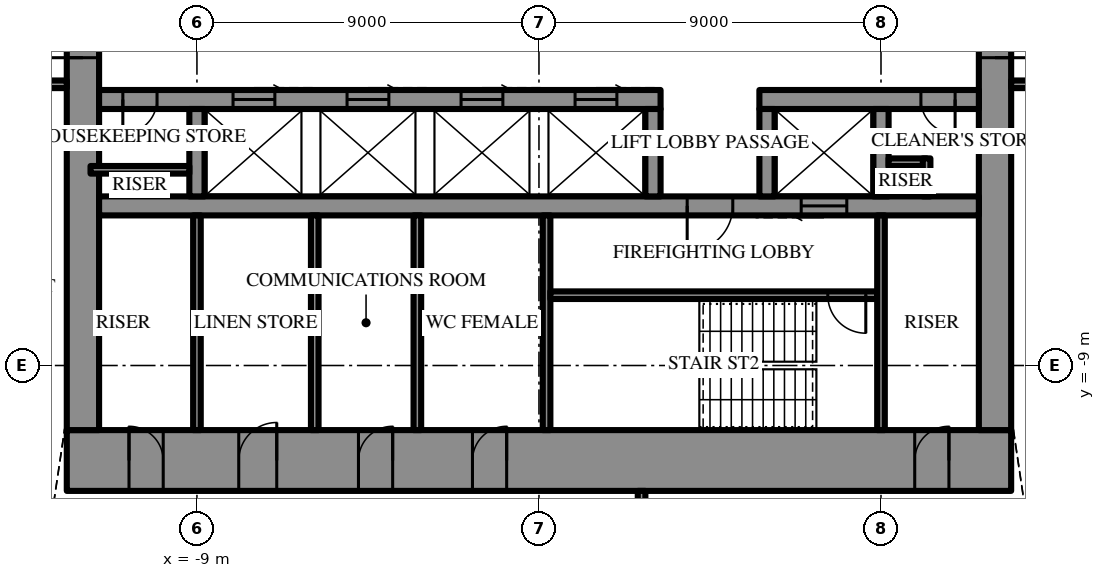
"""IFC4 building model, lengths in metres.
Left out: names, types, materials, properties, quantities, classifications, styles, units other than length and angle.
Written with IfcOpenShell. Run it as: python <this file> out.ifc"""

import sys

from ifc_helpers import new_model, si_unit, direction, frame, frame_2d, origin, place, context, subcontext, project, spatial, rectangle, extrude, element, fill, save


model = new_model("IFC4")
c1 = context("Model", 3, precision=1e-05, world=origin(), true_north=direction((0.0, 1.0)))
c2 = subcontext(c1, "Body", "Model", "MODEL_VIEW")
j1 = project(units=[si_unit("LENGTHUNIT", "METRE"), si_unit("PLANEANGLEUNIT", "RADIAN")], contexts=[c1])
p1 = place(None, origin())
s1 = spatial("IfcSite", under=j1, at=p1, CompositionType="ELEMENT")
p2 = place(p1, origin())
s2 = spatial("IfcBuilding", under=s1, at=p2, CompositionType="ELEMENT")
p3 = place(p2, frame((0.0, 0.0, 328.3)))
s3 = spatial("IfcBuildingStorey", under=s2, at=p3, CompositionType="ELEMENT", Elevation=328.3)
p4 = place(p3, frame((12.425, -11.5, 0.0), z_axis=(0.0, 0.0, 1.0), x_axis=(-1.0, 0.0, 0.0)))
e1 = element("IfcWall", 1, at=p4, inside=s3, PredefinedType="SHEAR", context=c2, shape_type="SweptSolid", body=[
    extrude(rectangle(XDim=24.85, YDim=1.6, at=frame_2d((12.425, 0.0))), origin(), (0.0, 0.0, 1.0), 4.2),
])
p5 = place(p4, frame((13.275, 0.0, 0.0)))
e2 = element("IfcOpeningElement", 2, at=p5, cuts=e1, PredefinedType="OPENING", context=c2, shape_type="SweptSolid", body=[
    extrude(rectangle(XDim=0.9, YDim=2.2, at=frame_2d((0.45, 1.1))), frame((0.0, 0.81, 0.0), z_axis=(0.0, -1.0, 0.0), x_axis=(1.0, 0.0, 0.0)), (0.0, 0.0, 1.0), 1.62),
])
p6 = place(p4, frame((16.275, 0.0, 0.0)))
e3 = element("IfcOpeningElement", 3, at=p6, cuts=e1, PredefinedType="OPENING", context=c2, shape_type="SweptSolid", body=[
    extrude(rectangle(XDim=0.9, YDim=2.2, at=frame_2d((0.45, 1.1))), frame((0.0, 0.81, 0.0), z_axis=(0.0, -1.0, 0.0), x_axis=(1.0, 0.0, 0.0)), (0.0, 0.0, 1.0), 1.62),
])
p7 = place(p4, frame((19.325, 0.0, 0.0)))
e4 = element("IfcOpeningElement", 4, at=p7, cuts=e1, PredefinedType="OPENING", context=c2, shape_type="SweptSolid", body=[
    extrude(rectangle(XDim=1.0, YDim=2.2, at=frame_2d((0.5, 1.1))), frame((0.0, 0.81, 0.0), z_axis=(0.0, -1.0, 0.0), x_axis=(1.0, 0.0, 0.0)), (0.0, 0.0, 1.0), 1.62),
])
p8 = place(p4, frame((1.637, 0.0, 0.0)))
e5 = element("IfcOpeningElement", 5, at=p8, cuts=e1, PredefinedType="OPENING", context=c2, shape_type="SweptSolid", body=[
    extrude(rectangle(XDim=0.9, YDim=2.2, at=frame_2d((0.45, 1.1))), frame((0.0, 0.81, 0.0), z_axis=(0.0, -1.0, 0.0), x_axis=(1.0, 0.0, 0.0)), (0.0, 0.0, 1.0), 1.62),
])
p9 = place(p4, frame((22.312, 0.0, 0.0)))
e6 = element("IfcOpeningElement", 6, at=p9, cuts=e1, PredefinedType="OPENING", context=c2, shape_type="SweptSolid", body=[
    extrude(rectangle(XDim=0.9, YDim=2.2, at=frame_2d((0.45, 1.1))), frame((0.0, 0.81, 0.0), z_axis=(0.0, -1.0, 0.0), x_axis=(1.0, 0.0, 0.0)), (0.0, 0.0, 1.0), 1.62),
])
p10 = place(p3, frame((12.0, -10.7, 0.0), z_axis=(0.0, 0.0, 1.0), x_axis=(0.0, 1.0, 0.0)))
e7 = element("IfcWall", 7, at=p10, inside=s3, PredefinedType="SHEAR", context=c2, shape_type="SweptSolid", body=[
    extrude(rectangle(XDim=21.4, YDim=0.85, at=frame_2d((10.7, 0.0))), origin(), (0.0, 0.0, 1.0), 4.2),
])
p11 = place(p10, frame((9.8, 0.0, 0.0)))
e8 = element("IfcOpeningElement", 8, at=p11, cuts=e7, PredefinedType="OPENING", context=c2, shape_type="SweptSolid", body=[
    extrude(rectangle(XDim=1.8, YDim=2.4, at=frame_2d((0.9, 1.2))), frame((0.0, 0.435, 0.0), z_axis=(0.0, -1.0, 0.0), x_axis=(1.0, 0.0, 0.0)), (0.0, 0.0, 1.0), 0.87),
])
p12 = place(p3, frame((-12.0, 10.7, 0.0), z_axis=(0.0, 0.0, 1.0), x_axis=(0.0, -1.0, 0.0)))
e9 = element("IfcWall", 9, at=p12, inside=s3, PredefinedType="SHEAR", context=c2, shape_type="SweptSolid", body=[
    extrude(rectangle(XDim=21.4, YDim=0.85, at=frame_2d((10.7, 0.0))), origin(), (0.0, 0.0, 1.0), 4.2),
])
p13 = place(p12, frame((9.8, 0.0, 0.0)))
e10 = element("IfcOpeningElement", 10, at=p13, cuts=e9, PredefinedType="OPENING", context=c2, shape_type="SweptSolid", body=[
    extrude(rectangle(XDim=1.8, YDim=2.4, at=frame_2d((0.9, 1.2))), frame((0.0, 0.435, 0.0), z_axis=(0.0, -1.0, 0.0), x_axis=(1.0, 0.0, 0.0)), (0.0, 0.0, 1.0), 0.87),
])
p14 = place(p3, frame((11.575, -2.0, 0.0), z_axis=(0.0, 0.0, 1.0), x_axis=(-1.0, 0.0, 0.0)))
e11 = element("IfcWall", 11, at=p14, inside=s3, PredefinedType="SHEAR", context=c2, shape_type="SweptSolid", body=[
    extrude(rectangle(XDim=5.775, YDim=0.5, at=frame_2d((2.887, 0.0))), origin(), (0.0, 0.0, 1.0), 4.2),
])
p15 = place(p14, frame((0.625, 0.0, 0.0)))
e12 = element("IfcOpeningElement", 12, at=p15, cuts=e11, PredefinedType="OPENING", context=c2, shape_type="SweptSolid", body=[
    extrude(rectangle(XDim=0.9, YDim=2.2, at=frame_2d((0.45, 1.1))), frame((0.0, 0.26, 0.0), z_axis=(0.0, -1.0, 0.0), x_axis=(1.0, 0.0, 0.0)), (0.0, 0.0, 1.0), 0.52),
])
p16 = place(p3, frame((3.2, -2.0, 0.0), z_axis=(0.0, 0.0, 1.0), x_axis=(-1.0, 0.0, 0.0)))
e13 = element("IfcWall", 13, at=p16, inside=s3, PredefinedType="SHEAR", context=c2, shape_type="SweptSolid", body=[
    extrude(rectangle(XDim=14.775, YDim=0.5, at=frame_2d((7.387, 0.0))), origin(), (0.0, 0.0, 1.0), 4.2),
])
p17 = place(p16, frame((13.25, 0.0, 0.0)))
e14 = element("IfcOpeningElement", 14, at=p17, cuts=e13, PredefinedType="OPENING", context=c2, shape_type="SweptSolid", body=[
    extrude(rectangle(XDim=0.9, YDim=2.2, at=frame_2d((0.45, 1.1))), frame((0.0, 0.26, 0.0), z_axis=(0.0, -1.0, 0.0), x_axis=(1.0, 0.0, 0.0)), (0.0, 0.0, 1.0), 0.52),
])
p18 = place(p16, frame((1.15, 0.0, 0.0)))
e15 = element("IfcOpeningElement", 15, at=p18, cuts=e13, PredefinedType="OPENING", context=c2, shape_type="SweptSolid", body=[
    extrude(rectangle(XDim=1.1, YDim=2.2, at=frame_2d((0.55, 1.1))), frame((0.0, 0.26, 0.0), z_axis=(0.0, -1.0, 0.0), x_axis=(1.0, 0.0, 0.0)), (0.0, 0.0, 1.0), 0.52),
])
p19 = place(p16, frame((4.15, 0.0, 0.0)))
e16 = element("IfcOpeningElement", 16, at=p19, cuts=e13, PredefinedType="OPENING", context=c2, shape_type="SweptSolid", body=[
    extrude(rectangle(XDim=1.1, YDim=2.2, at=frame_2d((0.55, 1.1))), frame((0.0, 0.26, 0.0), z_axis=(0.0, -1.0, 0.0), x_axis=(1.0, 0.0, 0.0)), (0.0, 0.0, 1.0), 0.52),
])
p20 = place(p16, frame((7.15, 0.0, 0.0)))
e17 = element("IfcOpeningElement", 17, at=p20, cuts=e13, PredefinedType="OPENING", context=c2, shape_type="SweptSolid", body=[
    extrude(rectangle(XDim=1.1, YDim=2.2, at=frame_2d((0.55, 1.1))), frame((0.0, 0.26, 0.0), z_axis=(0.0, -1.0, 0.0), x_axis=(1.0, 0.0, 0.0)), (0.0, 0.0, 1.0), 0.52),
])
p21 = place(p16, frame((10.15, 0.0, 0.0)))
e18 = element("IfcOpeningElement", 18, at=p21, cuts=e13, PredefinedType="OPENING", context=c2, shape_type="SweptSolid", body=[
    extrude(rectangle(XDim=1.1, YDim=2.2, at=frame_2d((0.55, 1.1))), frame((0.0, 0.26, 0.0), z_axis=(0.0, -1.0, 0.0), x_axis=(1.0, 0.0, 0.0)), (0.0, 0.0, 1.0), 0.52),
])
p22 = place(p3, frame((11.575, -4.8, 0.0), z_axis=(0.0, 0.0, 1.0), x_axis=(-1.0, 0.0, 0.0)))
e19 = element("IfcWall", 19, at=p22, inside=s3, PredefinedType="SHEAR", context=c2, shape_type="SweptSolid", body=[
    extrude(rectangle(XDim=23.15, YDim=0.5, at=frame_2d((11.575, 0.0))), origin(), (0.0, 0.0, 1.0), 4.2),
])
p23 = place(p22, frame((6.475, 0.0, 0.0)))
e20 = element("IfcOpeningElement", 20, at=p23, cuts=e19, PredefinedType="OPENING", context=c2, shape_type="SweptSolid", body=[
    extrude(rectangle(XDim=1.2, YDim=2.2, at=frame_2d((0.6, 1.1))), frame((0.0, 0.26, 0.0), z_axis=(0.0, -1.0, 0.0), x_axis=(1.0, 0.0, 0.0)), (0.0, 0.0, 1.0), 0.52),
])
p24 = place(p22, frame((3.475, 0.0, 0.0)))
e21 = element("IfcOpeningElement", 21, at=p24, cuts=e19, PredefinedType="OPENING", context=c2, shape_type="SweptSolid", body=[
    extrude(rectangle(XDim=1.2, YDim=2.2, at=frame_2d((0.6, 1.1))), frame((0.0, 0.26, 0.0), z_axis=(0.0, -1.0, 0.0), x_axis=(1.0, 0.0, 0.0)), (0.0, 0.0, 1.0), 0.52),
])
for number, where, z_axis, x_axis in (
    (22, (9.0, -2.25, 0.0), (0.0, 0.0, 1.0), (0.0, -1.0, 0.0)),
    (23, (6.0, -2.25, 0.0), (0.0, 0.0, 1.0), (0.0, -1.0, 0.0)),
    (24, (3.0, -2.25, 0.0), (0.0, 0.0, 1.0), (0.0, -1.0, 0.0)),
    (25, (-9.0, -2.25, 0.0), (0.0, 0.0, 1.0), (0.0, -1.0, 0.0)),
):
    element("IfcWall", number, at=place(p3, frame(where, z_axis=z_axis, x_axis=x_axis)), inside=s3, PredefinedType="SHEAR", context=c2, shape_type="SweptSolid", body=[
        extrude(rectangle(XDim=2.3, YDim=0.4, at=frame_2d((1.15, 0.0))), origin(), (0.0, 0.0, 1.0), 4.2),
    ])
p25 = place(p3, frame((0.2, -5.05, 0.0), z_axis=(0.0, 0.0, 1.0), x_axis=(0.0, -1.0, 0.0)))
e26 = element("IfcWall", 26, at=p25, inside=s3, PredefinedType="SHEAR", context=c2, shape_type="SweptSolid", body=[
    extrude(rectangle(XDim=5.65, YDim=0.2, at=frame_2d((2.825, 0.0))), origin(), (0.0, 0.0, 1.0), 4.2),
])
p26 = place(p3, frame((8.9, -7.15, 0.0), z_axis=(0.0, 0.0, 1.0), x_axis=(-1.0, 0.0, 0.0)))
e27 = element("IfcWall", 27, at=p26, inside=s3, PredefinedType="SHEAR", context=c2, shape_type="SweptSolid", body=[
    extrude(rectangle(XDim=8.6, YDim=0.2, at=frame_2d((4.3, 0.0))), origin(), (0.0, 0.0, 1.0), 4.2),
])
p27 = place(p26, frame((0.3, 0.0, 0.0)))
e28 = element("IfcOpeningElement", 28, at=p27, cuts=e27, PredefinedType="OPENING", context=c2, shape_type="SweptSolid", body=[
    extrude(rectangle(XDim=1.0, YDim=2.2, at=frame_2d((0.5, 1.1))), frame((0.0, 0.11, 0.0), z_axis=(0.0, -1.0, 0.0), x_axis=(1.0, 0.0, 0.0)), (0.0, 0.0, 1.0), 0.22),
])
for number, where, z_axis, x_axis in (
    (29, (9.0, -5.05, 0.0), (0.0, 0.0, 1.0), (0.0, -1.0, 0.0)),
    (30, (-9.0, -5.05, 0.0), (0.0, 0.0, 1.0), (0.0, -1.0, 0.0)),
    (31, (-3.2, -5.05, 0.0), (0.0, 0.0, 1.0), (0.0, -1.0, 0.0)),
    (32, (-5.9, -5.05, 0.0), (0.0, 0.0, 1.0), (0.0, -1.0, 0.0)),
):
    element("IfcWall", number, at=place(p3, frame(where, z_axis=z_axis, x_axis=x_axis)), inside=s3, PredefinedType="PARTITIONING", context=c2, shape_type="SweptSolid", body=[
        extrude(rectangle(XDim=5.65, YDim=0.2, at=frame_2d((2.825, 0.0))), origin(), (0.0, 0.0, 1.0), 4.0),
    ])
for number, where, z_axis, x_axis in (
    (33, (10.2, -3.65, 0.0), (0.0, 0.0, 1.0), (-1.0, 0.0, 0.0)),
    (34, (10.2, -3.55, 0.0), (0.0, 0.0, 1.0), (0.0, -1.0, 0.0)),
):
    element("IfcWall", number, at=place(p3, frame(where, z_axis=z_axis, x_axis=x_axis)), inside=s3, PredefinedType="PARTITIONING", context=c2, shape_type="SweptSolid", body=[
        extrude(rectangle(XDim=1.0, YDim=0.2, at=frame_2d((0.5, 0.0))), origin(), (0.0, 0.0, 1.0), 4.0),
    ])
p28 = place(p3, frame((-9.2, -3.85, 0.0), z_axis=(0.0, 0.0, 1.0), x_axis=(-1.0, 0.0, 0.0)))
e35 = element("IfcWall", 35, at=p28, inside=s3, PredefinedType="PARTITIONING", context=c2, shape_type="SweptSolid", body=[
    extrude(rectangle(XDim=2.6, YDim=0.2, at=frame_2d((1.3, 0.0))), origin(), (0.0, 0.0, 1.0), 4.0),
])
p29 = place(p3, frame((2.7, -12.3, 0.0), z_axis=(0.0, 0.0, 1.0), x_axis=(0.0, -1.0, 0.0)))
e36 = element("IfcWall", 36, at=p29, inside=s3, PredefinedType="PARTITIONING", context=c2, shape_type="SweptSolid", body=[
    extrude(rectangle(XDim=1.7, YDim=0.2, at=frame_2d((0.85, 0.0))), origin(), (0.0, 0.0, 1.0), 4.0),
])
p30 = place(p29, frame((0.35, 0.0, 0.0)))
e37 = element("IfcOpeningElement", 37, at=p30, cuts=e36, PredefinedType="OPENING", context=c2, shape_type="SweptSolid", body=[
    extrude(rectangle(XDim=1.0, YDim=2.2, at=frame_2d((0.5, 1.1))), frame((0.0, 0.11, 0.0), z_axis=(0.0, -1.0, 0.0), x_axis=(1.0, 0.0, 0.0)), (0.0, 0.0, 1.0), 0.22),
])
p31 = place(p3, frame((12.425, -1.6, 0.0), z_axis=(0.0, 0.0, 1.0), x_axis=(1.0, 0.0, 0.0)))
e38 = element("IfcWall", 38, at=p31, inside=s3, PredefinedType="PARTITIONING", context=c2, shape_type="SweptSolid", body=[
    extrude(rectangle(XDim=16.327, YDim=0.2, at=frame_2d((8.164, 0.0))), origin(), (0.0, 0.0, 1.0), 4.0),
])
p32 = place(p31, frame((1.133, 0.0, 0.0)))
e39 = element("IfcOpeningElement", 39, at=p32, cuts=e38, PredefinedType="OPENING", context=c2, shape_type="SweptSolid", body=[
    extrude(rectangle(XDim=1.0, YDim=2.2, at=frame_2d((0.5, 1.1))), frame((0.0, 0.11, 0.0), z_axis=(0.0, -1.0, 0.0), x_axis=(1.0, 0.0, 0.0)), (0.0, 0.0, 1.0), 0.22),
])
p33 = place(p3, frame((-12.425, -1.6, 0.0), z_axis=(0.0, 0.0, 1.0), x_axis=(-1.0, 0.0, 0.0)))
e40 = element("IfcWall", 40, at=p33, inside=s3, PredefinedType="PARTITIONING", context=c2, shape_type="SweptSolid", body=[
    extrude(rectangle(XDim=16.327, YDim=0.2, at=frame_2d((8.164, 0.0))), origin(), (0.0, 0.0, 1.0), 4.0),
])
p34 = place(p33, frame((1.133, 0.0, 0.0)))
e41 = element("IfcOpeningElement", 41, at=p34, cuts=e40, PredefinedType="OPENING", context=c2, shape_type="SweptSolid", body=[
    extrude(rectangle(XDim=1.0, YDim=2.2, at=frame_2d((0.5, 1.1))), frame((0.0, 0.11, 0.0), z_axis=(0.0, -1.0, 0.0), x_axis=(1.0, 0.0, 0.0)), (0.0, 0.0, 1.0), 0.22),
])
p35 = place(p11, frame((1.8, 0.0, 0.0), z_axis=(0.0, 0.0, 1.0), x_axis=(-1.0, 0.0, 0.0)))
e42 = element("IfcDoor", 42, at=p35, inside=s3, OperationType="DOUBLE_DOOR_SINGLE_SWING", PredefinedType="DOOR", context=c2, shape_type="SweptSolid", body=[
    extrude(rectangle(XDim=1.8, YDim=2.4, at=frame_2d((0.9, 1.2))), frame((0.0, 0.025, 0.0), z_axis=(0.0, -1.0, 0.0), x_axis=(1.0, 0.0, 0.0)), (0.0, 0.0, 1.0), 0.05),
])
fill(e8, e42)
p36 = place(p13, frame((1.8, 0.0, 0.0), z_axis=(0.0, 0.0, 1.0), x_axis=(-1.0, 0.0, 0.0)))
e43 = element("IfcDoor", 43, at=p36, inside=s3, OperationType="DOUBLE_DOOR_SINGLE_SWING", PredefinedType="DOOR", context=c2, shape_type="SweptSolid", body=[
    extrude(rectangle(XDim=1.8, YDim=2.4, at=frame_2d((0.9, 1.2))), frame((0.0, 0.025, 0.0), z_axis=(0.0, -1.0, 0.0), x_axis=(1.0, 0.0, 0.0)), (0.0, 0.0, 1.0), 0.05),
])
fill(e10, e43)
p37 = place(p23, origin())
e44 = element("IfcDoor", 44, at=p37, inside=s3, OperationType="SINGLE_SWING_LEFT", PredefinedType="DOOR", context=c2, shape_type="SweptSolid", body=[
    extrude(rectangle(XDim=1.2, YDim=2.2, at=frame_2d((0.6, 1.1))), frame((0.0, 0.025, 0.0), z_axis=(0.0, -1.0, 0.0), x_axis=(1.0, 0.0, 0.0)), (0.0, 0.0, 1.0), 0.05),
])
fill(e20, e44)
p38 = place(p27, origin())
e45 = element("IfcDoor", 45, at=p38, inside=s3, OperationType="SINGLE_SWING_RIGHT", PredefinedType="DOOR", context=c2, shape_type="SweptSolid", body=[
    extrude(rectangle(XDim=1.0, YDim=2.2, at=frame_2d((0.5, 1.1))), frame((0.0, 0.025, 0.0), z_axis=(0.0, -1.0, 0.0), x_axis=(1.0, 0.0, 0.0)), (0.0, 0.0, 1.0), 0.05),
])
fill(e28, e45)
p39 = place(p5, frame((0.9, 0.0, 0.0), z_axis=(0.0, 0.0, 1.0), x_axis=(-1.0, 0.0, 0.0)))
e46 = element("IfcDoor", 46, at=p39, inside=s3, OperationType="SINGLE_SWING_LEFT", PredefinedType="DOOR", context=c2, shape_type="SweptSolid", body=[
    extrude(rectangle(XDim=0.9, YDim=2.2, at=frame_2d((0.45, 1.1))), frame((0.0, 0.025, 0.0), z_axis=(0.0, -1.0, 0.0), x_axis=(1.0, 0.0, 0.0)), (0.0, 0.0, 1.0), 0.05),
])
fill(e2, e46)
p40 = place(p6, frame((0.9, 0.0, 0.0), z_axis=(0.0, 0.0, 1.0), x_axis=(-1.0, 0.0, 0.0)))
e47 = element("IfcDoor", 47, at=p40, inside=s3, OperationType="SINGLE_SWING_LEFT", PredefinedType="DOOR", context=c2, shape_type="SweptSolid", body=[
    extrude(rectangle(XDim=0.9, YDim=2.2, at=frame_2d((0.45, 1.1))), frame((0.0, 0.025, 0.0), z_axis=(0.0, -1.0, 0.0), x_axis=(1.0, 0.0, 0.0)), (0.0, 0.0, 1.0), 0.05),
])
fill(e3, e47)
p41 = place(p7, frame((1.0, 0.0, 0.0), z_axis=(0.0, 0.0, 1.0), x_axis=(-1.0, 0.0, 0.0)))
e48 = element("IfcDoor", 48, at=p41, inside=s3, OperationType="SINGLE_SWING_LEFT", PredefinedType="DOOR", context=c2, shape_type="SweptSolid", body=[
    extrude(rectangle(XDim=1.0, YDim=2.2, at=frame_2d((0.5, 1.1))), frame((0.0, 0.025, 0.0), z_axis=(0.0, -1.0, 0.0), x_axis=(1.0, 0.0, 0.0)), (0.0, 0.0, 1.0), 0.05),
])
fill(e4, e48)
p42 = place(p8, frame((0.9, 0.0, 0.0), z_axis=(0.0, 0.0, 1.0), x_axis=(-1.0, 0.0, 0.0)))
e49 = element("IfcDoor", 49, at=p42, inside=s3, OperationType="SINGLE_SWING_LEFT", PredefinedType="DOOR", context=c2, shape_type="SweptSolid", body=[
    extrude(rectangle(XDim=0.9, YDim=2.2, at=frame_2d((0.45, 1.1))), frame((0.0, 0.025, 0.0), z_axis=(0.0, -1.0, 0.0), x_axis=(1.0, 0.0, 0.0)), (0.0, 0.0, 1.0), 0.05),
])
fill(e5, e49)
p43 = place(p9, frame((0.9, 0.0, 0.0), z_axis=(0.0, 0.0, 1.0), x_axis=(-1.0, 0.0, 0.0)))
e50 = element("IfcDoor", 50, at=p43, inside=s3, OperationType="SINGLE_SWING_RIGHT", PredefinedType="DOOR", context=c2, shape_type="SweptSolid", body=[
    extrude(rectangle(XDim=0.9, YDim=2.2, at=frame_2d((0.45, 1.1))), frame((0.0, 0.025, 0.0), z_axis=(0.0, -1.0, 0.0), x_axis=(1.0, 0.0, 0.0)), (0.0, 0.0, 1.0), 0.05),
])
fill(e6, e50)
p44 = place(p15, origin())
e51 = element("IfcDoor", 51, at=p44, inside=s3, OperationType="SINGLE_SWING_RIGHT", PredefinedType="DOOR", context=c2, shape_type="SweptSolid", body=[
    extrude(rectangle(XDim=0.9, YDim=2.2, at=frame_2d((0.45, 1.1))), frame((0.0, 0.025, 0.0), z_axis=(0.0, -1.0, 0.0), x_axis=(1.0, 0.0, 0.0)), (0.0, 0.0, 1.0), 0.05),
])
fill(e12, e51)
p45 = place(p17, origin())
e52 = element("IfcDoor", 52, at=p45, inside=s3, OperationType="SINGLE_SWING_LEFT", PredefinedType="DOOR", context=c2, shape_type="SweptSolid", body=[
    extrude(rectangle(XDim=0.9, YDim=2.2, at=frame_2d((0.45, 1.1))), frame((0.0, 0.025, 0.0), z_axis=(0.0, -1.0, 0.0), x_axis=(1.0, 0.0, 0.0)), (0.0, 0.0, 1.0), 0.05),
])
fill(e14, e52)
p46 = place(p24, origin())
e53 = element("IfcDoor", 53, at=p46, inside=s3, OperationType="SLIDING_TO_LEFT", PredefinedType="DOOR", context=c2, shape_type="SweptSolid", body=[
    extrude(rectangle(XDim=1.2, YDim=2.2, at=frame_2d((0.6, 1.1))), frame((0.0, 0.025, 0.0), z_axis=(0.0, -1.0, 0.0), x_axis=(1.0, 0.0, 0.0)), (0.0, 0.0, 1.0), 0.05),
])
fill(e21, e53)
p47 = place(p18, frame((1.1, 0.0, 0.0), z_axis=(0.0, 0.0, 1.0), x_axis=(-1.0, 0.0, 0.0)))
e54 = element("IfcDoor", 54, at=p47, inside=s3, OperationType="SLIDING_TO_LEFT", PredefinedType="DOOR", context=c2, shape_type="SweptSolid", body=[
    extrude(rectangle(XDim=1.1, YDim=2.2, at=frame_2d((0.55, 1.1))), frame((0.0, 0.025, 0.0), z_axis=(0.0, -1.0, 0.0), x_axis=(1.0, 0.0, 0.0)), (0.0, 0.0, 1.0), 0.05),
])
fill(e15, e54)
p48 = place(p19, frame((1.1, 0.0, 0.0), z_axis=(0.0, 0.0, 1.0), x_axis=(-1.0, 0.0, 0.0)))
e55 = element("IfcDoor", 55, at=p48, inside=s3, OperationType="SLIDING_TO_LEFT", PredefinedType="DOOR", context=c2, shape_type="SweptSolid", body=[
    extrude(rectangle(XDim=1.1, YDim=2.2, at=frame_2d((0.55, 1.1))), frame((0.0, 0.025, 0.0), z_axis=(0.0, -1.0, 0.0), x_axis=(1.0, 0.0, 0.0)), (0.0, 0.0, 1.0), 0.05),
])
fill(e16, e55)
p49 = place(p20, frame((1.1, 0.0, 0.0), z_axis=(0.0, 0.0, 1.0), x_axis=(-1.0, 0.0, 0.0)))
e56 = element("IfcDoor", 56, at=p49, inside=s3, OperationType="SLIDING_TO_LEFT", PredefinedType="DOOR", context=c2, shape_type="SweptSolid", body=[
    extrude(rectangle(XDim=1.1, YDim=2.2, at=frame_2d((0.55, 1.1))), frame((0.0, 0.025, 0.0), z_axis=(0.0, -1.0, 0.0), x_axis=(1.0, 0.0, 0.0)), (0.0, 0.0, 1.0), 0.05),
])
fill(e17, e56)
p50 = place(p21, frame((1.1, 0.0, 0.0), z_axis=(0.0, 0.0, 1.0), x_axis=(-1.0, 0.0, 0.0)))
e57 = element("IfcDoor", 57, at=p50, inside=s3, OperationType="SLIDING_TO_LEFT", PredefinedType="DOOR", context=c2, shape_type="SweptSolid", body=[
    extrude(rectangle(XDim=1.1, YDim=2.2, at=frame_2d((0.55, 1.1))), frame((0.0, 0.025, 0.0), z_axis=(0.0, -1.0, 0.0), x_axis=(1.0, 0.0, 0.0)), (0.0, 0.0, 1.0), 0.05),
])
fill(e18, e57)
save(model, sys.argv[1])
